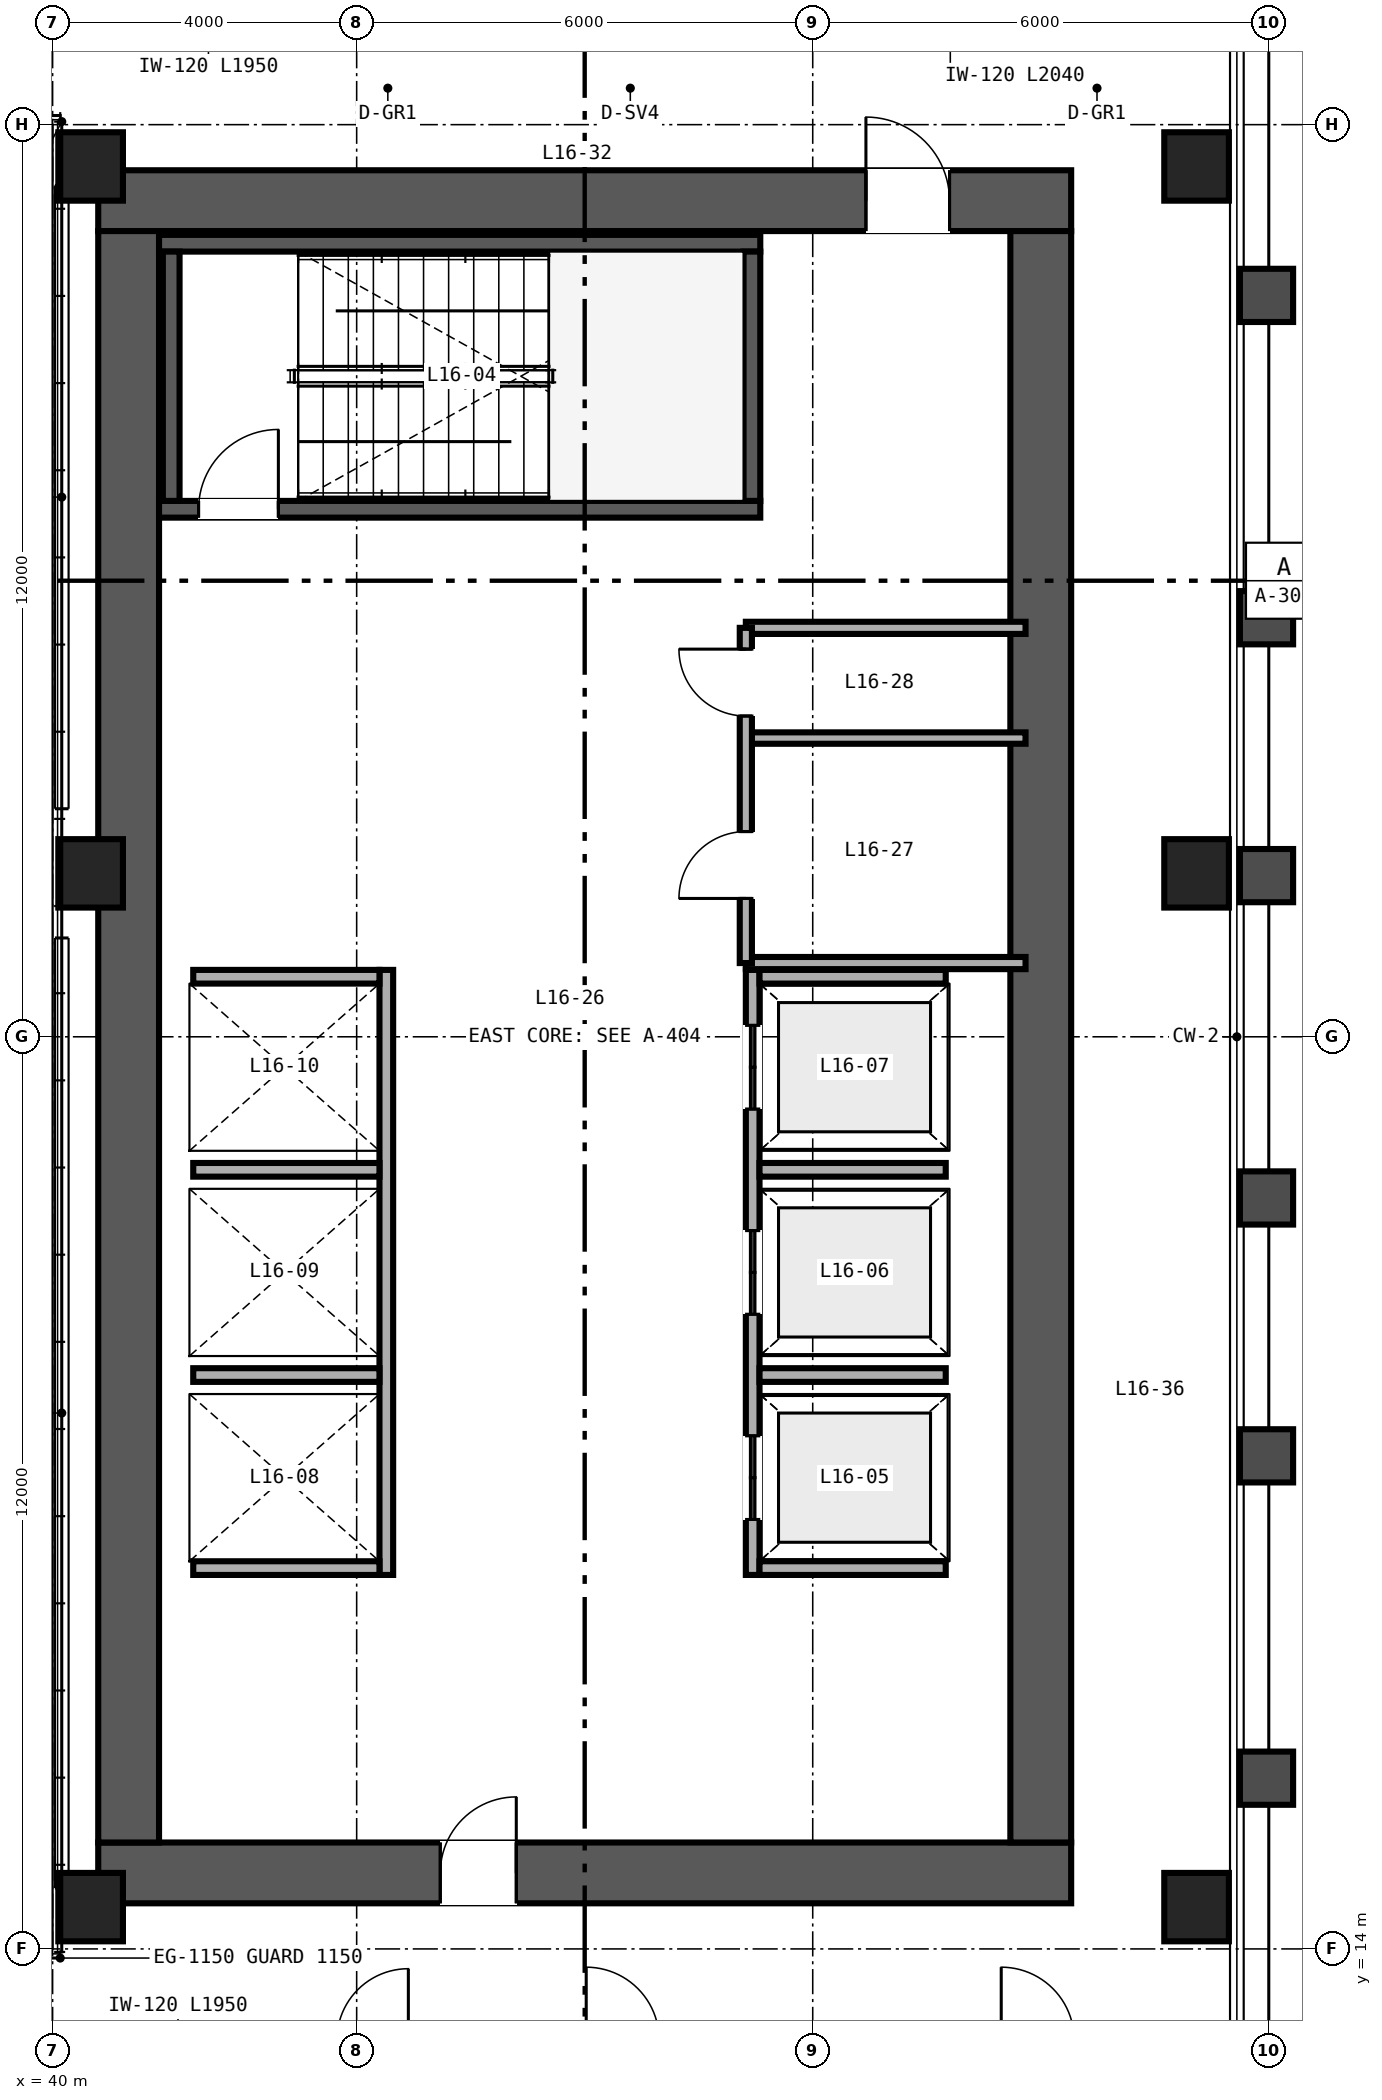
"""IFC4 building model, lengths in metres.
Left out: names, types, materials, properties, quantities, classifications, styles, units other than length and angle.
Written with IfcOpenShell. Run it as: python <this file> out.ifc"""

import sys

from ifc_helpers import new_model, si_unit, direction, frame, frame_2d, origin, origin_2d, place, context, subcontext, project, spatial, rectangle, hollow_rectangle, extrude, source, transform, mapped, element, fill, save


model = new_model("IFC4")
c1 = context("Model", 3, precision=1e-05, world=origin(), true_north=direction((0.0, 1.0)))
c2 = subcontext(c1, "Body", "Model", "MODEL_VIEW")
j1 = project(units=[si_unit("LENGTHUNIT", "METRE"), si_unit("PLANEANGLEUNIT", "RADIAN")], contexts=[c1])
p1 = place(None, origin())
s1 = spatial("IfcSite", under=j1, at=p1, CompositionType="ELEMENT")
p2 = place(p1, origin())
s2 = spatial("IfcBuilding", under=s1, at=p2, CompositionType="ELEMENT")
p3 = place(p2, frame((0.0, 0.0, 67.2)))
s3 = spatial("IfcBuildingStorey", under=s2, at=p3, CompositionType="ELEMENT", Elevation=67.2)
p4 = place(p3, frame((40.6, 15.0, 0.0), z_axis=(0.0, 0.0, 1.0), x_axis=(1.0, 0.0, 0.0)))
e1 = element("IfcWall", 1, at=p4, inside=s3, PredefinedType="SHEAR", context=c2, shape_type="SweptSolid", body=[
    extrude(rectangle(XDim=12.8, YDim=0.8, at=frame_2d((6.4, 0.0))), origin(), (0.0, 0.0, 1.0), 3.35),
])
p5 = place(p4, frame((4.5, 0.0, 0.0)))
e2 = element("IfcOpeningElement", 2, at=p5, cuts=e1, PredefinedType="OPENING", context=c2, shape_type="SweptSolid", body=[
    extrude(rectangle(XDim=1.0, YDim=2.15, at=frame_2d((0.5, 1.075))), frame((0.0, 0.41, 0.0), z_axis=(0.0, -1.0, 0.0), x_axis=(1.0, 0.0, 0.0)), (0.0, 0.0, 1.0), 0.82),
])
p6 = place(p3, frame((40.6, 37.0, 0.0), z_axis=(0.0, 0.0, 1.0), x_axis=(1.0, 0.0, 0.0)))
e3 = element("IfcWall", 3, at=p6, inside=s3, PredefinedType="SHEAR", context=c2, shape_type="SweptSolid", body=[
    extrude(rectangle(XDim=12.8, YDim=0.8, at=frame_2d((6.4, 0.0))), origin(), (0.0, 0.0, 1.0), 3.35),
])
p7 = place(p6, frame((10.1, 0.0, 0.0)))
e4 = element("IfcOpeningElement", 4, at=p7, cuts=e3, PredefinedType="OPENING", context=c2, shape_type="SweptSolid", body=[
    extrude(rectangle(XDim=1.1, YDim=2.15, at=frame_2d((0.55, 1.075))), frame((0.0, 0.41, 0.0), z_axis=(0.0, -1.0, 0.0), x_axis=(1.0, 0.0, 0.0)), (0.0, 0.0, 1.0), 0.82),
])
for number, where, z_axis, x_axis in (
    (5, (41.0, 15.4, 0.0), (0.0, 0.0, 1.0), (0.0, 1.0, 0.0)),
    (6, (53.0, 15.4, 0.0), (0.0, 0.0, 1.0), (0.0, 1.0, 0.0)),
):
    element("IfcWall", number, at=place(p3, frame(where, z_axis=z_axis, x_axis=x_axis)), inside=s3, PredefinedType="SHEAR", context=c2, shape_type="SweptSolid", body=[
        extrude(rectangle(XDim=21.2, YDim=0.8, at=frame_2d((10.6, 0.0))), origin(), (0.0, 0.0, 1.0), 3.35),
    ])
p8 = place(p3, frame((41.4, 32.94, 0.0), z_axis=(0.0, 0.0, 1.0), x_axis=(1.0, 0.0, 0.0)))
e7 = element("IfcWall", 7, at=p8, inside=s3, PredefinedType="SHEAR", context=c2, shape_type="SweptSolid", body=[
    extrude(rectangle(XDim=7.91, YDim=0.22, at=frame_2d((3.955, 0.0))), origin(), (0.0, 0.0, 1.0), 3.4),
])
p9 = place(p8, frame((0.52, 0.0, 0.0)))
e8 = element("IfcOpeningElement", 8, at=p9, cuts=e7, PredefinedType="OPENING", context=c2, shape_type="SweptSolid", body=[
    extrude(rectangle(XDim=1.05, YDim=2.15, at=frame_2d((0.525, 1.075))), frame((0.0, 0.12, 0.0), z_axis=(0.0, -1.0, 0.0), x_axis=(1.0, 0.0, 0.0)), (0.0, 0.0, 1.0), 0.24),
])
p10 = place(p3, frame((41.4, 36.44, 0.0), z_axis=(0.0, 0.0, 1.0), x_axis=(1.0, 0.0, 0.0)))
e9 = element("IfcWall", 9, at=p10, inside=s3, PredefinedType="SHEAR", context=c2, shape_type="SweptSolid", body=[
    extrude(rectangle(XDim=7.91, YDim=0.22, at=frame_2d((3.955, 0.0))), origin(), (0.0, 0.0, 1.0), 3.4),
])
for number, where, z_axis, x_axis in (
    (10, (41.56, 33.05, 0.0), (0.0, 0.0, 1.0), (0.0, 1.0, 0.0)),
    (11, (49.2, 33.05, 0.0), (0.0, 0.0, 1.0), (0.0, 1.0, 0.0)),
):
    element("IfcWall", number, at=place(p3, frame(where, z_axis=z_axis, x_axis=x_axis)), inside=s3, PredefinedType="SHEAR", context=c2, shape_type="SweptSolid", body=[
        extrude(rectangle(XDim=3.28, YDim=0.22, at=frame_2d((1.64, 0.0))), origin(), (0.0, 0.0, 1.0), 3.4),
    ])
m1 = source(origin(), c2, "Body", "SweptSolid", [
    extrude(hollow_rectangle(XDim=0.85, YDim=0.9, WallThickness=0.04, at=origin_2d()), origin(), (0.0, 0.0, 1.0), 3.35),
])
for number, where, z_axis, x_axis in (
    (12, (40.5, 14.55, 0.0), (0.0, 0.0, 1.0), (1.0, 0.0, 0.0)),
    (13, (55.05, 14.55, 0.0), (0.0, 0.0, 1.0), (1.0, 0.0, 0.0)),
    (14, (40.5, 28.15, 0.0), (0.0, 0.0, 1.0), (1.0, 0.0, 0.0)),
    (15, (55.05, 28.15, 0.0), (0.0, 0.0, 1.0), (1.0, 0.0, 0.0)),
    (16, (40.5, 37.45, 0.0), (0.0, 0.0, 1.0), (1.0, 0.0, 0.0)),
    (17, (55.05, 37.45, 0.0), (0.0, 0.0, 1.0), (1.0, 0.0, 0.0)),
):
    element("IfcColumn", number, at=place(p3, frame(where, z_axis=z_axis, x_axis=x_axis)), inside=s3, PredefinedType="COLUMN", context=c2, shape_type="MappedRepresentation", body=[
        mapped(m1, transform((0.0, 0.0, 0.0), scale=1.0)),
    ])
p11 = place(p3, frame((49.21, 18.92, 0.0), z_axis=(0.0, 0.0, 1.0), x_axis=(0.0, 1.0, 0.0)))
e18 = element("IfcWall", 18, at=p11, inside=s3, PredefinedType="SOLIDWALL", context=c2, shape_type="SweptSolid", body=[
    extrude(rectangle(XDim=7.96, YDim=0.18, at=frame_2d((3.98, 0.0))), origin(), (0.0, 0.0, 1.0), 3.35),
])
p12 = place(p11, frame((0.73, 0.0, 0.0)))
e19 = element("IfcOpeningElement", 19, at=p12, cuts=e18, PredefinedType="OPENING", context=c2, shape_type="SweptSolid", body=[
    extrude(rectangle(XDim=1.1, YDim=2.2, at=frame_2d((0.55, 1.1))), frame((0.0, 0.1, 0.0), z_axis=(0.0, -1.0, 0.0), x_axis=(1.0, 0.0, 0.0)), (0.0, 0.0, 1.0), 0.2),
])
p13 = place(p11, frame((3.43, 0.0, 0.0)))
e20 = element("IfcOpeningElement", 20, at=p13, cuts=e18, PredefinedType="OPENING", context=c2, shape_type="SweptSolid", body=[
    extrude(rectangle(XDim=1.1, YDim=2.2, at=frame_2d((0.55, 1.1))), frame((0.0, 0.1, 0.0), z_axis=(0.0, -1.0, 0.0), x_axis=(1.0, 0.0, 0.0)), (0.0, 0.0, 1.0), 0.2),
])
p14 = place(p11, frame((6.13, 0.0, 0.0)))
e21 = element("IfcOpeningElement", 21, at=p14, cuts=e18, PredefinedType="OPENING", context=c2, shape_type="SweptSolid", body=[
    extrude(rectangle(XDim=1.1, YDim=2.2, at=frame_2d((0.55, 1.1))), frame((0.0, 0.1, 0.0), z_axis=(0.0, -1.0, 0.0), x_axis=(1.0, 0.0, 0.0)), (0.0, 0.0, 1.0), 0.2),
])
for number, where, z_axis, x_axis in (
    (22, (49.3, 19.01, 0.0), (0.0, 0.0, 1.0), (1.0, 0.0, 0.0)),
    (23, (49.3, 26.79, 0.0), (0.0, 0.0, 1.0), (1.0, 0.0, 0.0)),
    (24, (49.3, 21.55, 0.0), (0.0, 0.0, 1.0), (1.0, 0.0, 0.0)),
    (25, (49.3, 24.25, 0.0), (0.0, 0.0, 1.0), (1.0, 0.0, 0.0)),
):
    element("IfcWall", number, at=place(p3, frame(where, z_axis=z_axis, x_axis=x_axis)), inside=s3, PredefinedType="SOLIDWALL", context=c2, shape_type="SweptSolid", body=[
        extrude(rectangle(XDim=2.45, YDim=0.18, at=frame_2d((1.225, 0.0))), origin(), (0.0, 0.0, 1.0), 3.35),
    ])
p15 = place(p3, frame((44.39, 18.92, 0.0), z_axis=(0.0, 0.0, 1.0), x_axis=(0.0, 1.0, 0.0)))
e26 = element("IfcWall", 26, at=p15, inside=s3, PredefinedType="SOLIDWALL", context=c2, shape_type="SweptSolid", body=[
    extrude(rectangle(XDim=7.96, YDim=0.18, at=frame_2d((3.98, 0.0))), origin(), (0.0, 0.0, 1.0), 3.35),
])
for number, where, z_axis, x_axis in (
    (27, (41.85, 19.01, 0.0), (0.0, 0.0, 1.0), (1.0, 0.0, 0.0)),
    (28, (41.85, 26.79, 0.0), (0.0, 0.0, 1.0), (1.0, 0.0, 0.0)),
    (29, (41.85, 21.55, 0.0), (0.0, 0.0, 1.0), (1.0, 0.0, 0.0)),
    (30, (41.85, 24.25, 0.0), (0.0, 0.0, 1.0), (1.0, 0.0, 0.0)),
):
    element("IfcWall", number, at=place(p3, frame(where, z_axis=z_axis, x_axis=x_axis)), inside=s3, PredefinedType="SOLIDWALL", context=c2, shape_type="SweptSolid", body=[
        extrude(rectangle(XDim=2.45, YDim=0.18, at=frame_2d((1.225, 0.0))), origin(), (0.0, 0.0, 1.0), 3.35),
    ])
p16 = place(p3, frame((49.12, 26.97, 0.0), z_axis=(0.0, 0.0, 1.0), x_axis=(1.0, 0.0, 0.0)))
e31 = element("IfcWall", 31, at=p16, inside=s3, PredefinedType="PARTITIONING", context=c2, shape_type="SweptSolid", body=[
    extrude(rectangle(XDim=3.68, YDim=0.16, at=frame_2d((1.84, 0.0))), origin(), (0.0, 0.0, 1.0), 3.35),
])
p17 = place(p3, frame((49.12, 31.38, 0.0), z_axis=(0.0, 0.0, 1.0), x_axis=(1.0, 0.0, 0.0)))
e32 = element("IfcWall", 32, at=p17, inside=s3, PredefinedType="PARTITIONING", context=c2, shape_type="SweptSolid", body=[
    extrude(rectangle(XDim=3.68, YDim=0.16, at=frame_2d((1.84, 0.0))), origin(), (0.0, 0.0, 1.0), 2.36),
])
p18 = place(p3, frame((49.12, 29.93, 0.0), z_axis=(0.0, 0.0, 1.0), x_axis=(1.0, 0.0, 0.0)))
e33 = element("IfcWall", 33, at=p18, inside=s3, PredefinedType="PARTITIONING", context=c2, shape_type="SweptSolid", body=[
    extrude(rectangle(XDim=3.68, YDim=0.15, at=frame_2d((1.84, 0.0))), origin(), (0.0, 0.0, 1.0), 3.35),
])
p19 = place(p3, frame((49.12, 26.97, 0.0), z_axis=(0.0, 0.0, 1.0), x_axis=(0.0, 1.0, 0.0)))
e34 = element("IfcWall", 34, at=p19, inside=s3, PredefinedType="PARTITIONING", context=c2, shape_type="SweptSolid", body=[
    extrude(rectangle(XDim=4.41, YDim=0.16, at=frame_2d((2.205, 0.0))), origin(), (0.0, 0.0, 1.0), 2.36),
])
p20 = place(p19, frame((0.85, 0.0, 0.0)))
e35 = element("IfcOpeningElement", 35, at=p20, cuts=e34, PredefinedType="OPENING", context=c2, shape_type="SweptSolid", body=[
    extrude(rectangle(XDim=0.88, YDim=2.15, at=frame_2d((0.44, 1.075))), frame((0.0, 0.09, 0.0), z_axis=(0.0, -1.0, 0.0), x_axis=(1.0, 0.0, 0.0)), (0.0, 0.0, 1.0), 0.18),
])
p21 = place(p19, frame((3.25, 0.0, 0.0)))
e36 = element("IfcOpeningElement", 36, at=p21, cuts=e34, PredefinedType="OPENING", context=c2, shape_type="SweptSolid", body=[
    extrude(rectangle(XDim=0.88, YDim=2.15, at=frame_2d((0.44, 1.075))), frame((0.0, 0.09, 0.0), z_axis=(0.0, -1.0, 0.0), x_axis=(1.0, 0.0, 0.0)), (0.0, 0.0, 1.0), 0.18),
])
m2 = source(origin(), c2, "Body", "SweptSolid", [
    extrude(rectangle(XDim=1.05, YDim=2.15, at=frame_2d((0.525, 1.075))), frame((0.0, 0.025, 0.0), z_axis=(0.0, -1.0, 0.0), x_axis=(1.0, 0.0, 0.0)), (0.0, 0.0, 1.0), 0.05),
])
p22 = place(p9, origin())
e37 = element("IfcDoor", 37, at=p22, inside=s3, OperationType="SINGLE_SWING_RIGHT", PredefinedType="DOOR", context=c2, shape_type="MappedRepresentation", body=[
    mapped(m2, transform((0.0, 0.0, 0.0), scale=1.0)),
])
fill(e8, e37)
m3 = source(origin(), c2, "Body", "SweptSolid", [
    extrude(rectangle(XDim=1.1, YDim=2.2, at=frame_2d((0.55, 1.1))), frame((0.0, 0.025, 0.0), z_axis=(0.0, -1.0, 0.0), x_axis=(1.0, 0.0, 0.0)), (0.0, 0.0, 1.0), 0.05),
])
p23 = place(p12, origin())
e38 = element("IfcDoor", 38, at=p23, inside=s3, OperationType="DOUBLE_DOOR_SLIDING", PredefinedType="DOOR", context=c2, shape_type="MappedRepresentation", body=[
    mapped(m3, transform((0.0, 0.0, 0.0), scale=1.0)),
])
fill(e19, e38)
p24 = place(p13, origin())
e39 = element("IfcDoor", 39, at=p24, inside=s3, OperationType="DOUBLE_DOOR_SLIDING", PredefinedType="DOOR", context=c2, shape_type="MappedRepresentation", body=[
    mapped(m3, transform((0.0, 0.0, 0.0), scale=1.0)),
])
fill(e20, e39)
p25 = place(p14, origin())
e40 = element("IfcDoor", 40, at=p25, inside=s3, OperationType="DOUBLE_DOOR_SLIDING", PredefinedType="DOOR", context=c2, shape_type="MappedRepresentation", body=[
    mapped(m3, transform((0.0, 0.0, 0.0), scale=1.0)),
])
fill(e21, e40)
m4 = source(origin(), c2, "Body", "SweptSolid", [
    extrude(rectangle(XDim=1.0, YDim=2.15, at=frame_2d((0.5, 1.075))), frame((0.0, 0.025, 0.0), z_axis=(0.0, -1.0, 0.0), x_axis=(1.0, 0.0, 0.0)), (0.0, 0.0, 1.0), 0.05),
])
p26 = place(p5, origin())
e41 = element("IfcDoor", 41, at=p26, inside=s3, OperationType="SINGLE_SWING_RIGHT", PredefinedType="DOOR", context=c2, shape_type="MappedRepresentation", body=[
    mapped(m4, transform((0.0, 0.0, 0.0), scale=1.0)),
])
fill(e2, e41)
m5 = source(origin(), c2, "Body", "SweptSolid", [
    extrude(rectangle(XDim=1.1, YDim=2.15, at=frame_2d((0.55, 1.075))), frame((0.0, 0.025, 0.0), z_axis=(0.0, -1.0, 0.0), x_axis=(1.0, 0.0, 0.0)), (0.0, 0.0, 1.0), 0.05),
])
p27 = place(p7, origin())
e42 = element("IfcDoor", 42, at=p27, inside=s3, OperationType="SINGLE_SWING_LEFT", PredefinedType="DOOR", context=c2, shape_type="MappedRepresentation", body=[
    mapped(m5, transform((0.0, 0.0, 0.0), scale=1.0)),
])
fill(e4, e42)
m6 = source(origin(), c2, "Body", "SweptSolid", [
    extrude(rectangle(XDim=0.88, YDim=2.15, at=frame_2d((0.44, 1.075))), frame((0.0, 0.025, 0.0), z_axis=(0.0, -1.0, 0.0), x_axis=(1.0, 0.0, 0.0)), (0.0, 0.0, 1.0), 0.05),
])
p28 = place(p20, origin())
e43 = element("IfcDoor", 43, at=p28, inside=s3, OperationType="SINGLE_SWING_LEFT", PredefinedType="DOOR", context=c2, shape_type="MappedRepresentation", body=[
    mapped(m6, transform((0.0, 0.0, 0.0), scale=1.0)),
])
fill(e35, e43)
p29 = place(p21, origin())
e44 = element("IfcDoor", 44, at=p29, inside=s3, OperationType="SINGLE_SWING_RIGHT", PredefinedType="DOOR", context=c2, shape_type="MappedRepresentation", body=[
    mapped(m6, transform((0.0, 0.0, 0.0), scale=1.0)),
])
fill(e36, e44)
save(model, sys.argv[1])
